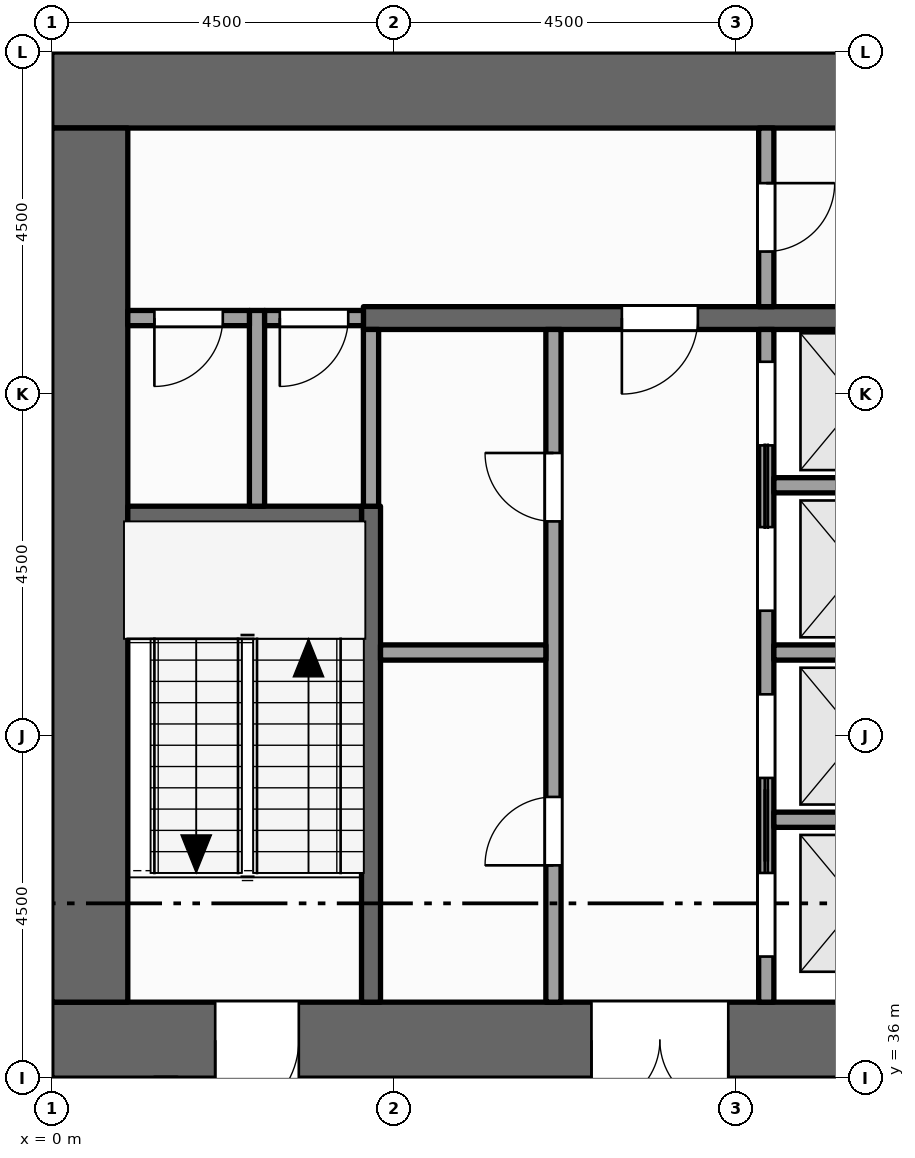
"""IFC4 building model, lengths in metres.
Left out: names, types, materials, properties, quantities, classifications, styles, units other than length and angle.
Written with IfcOpenShell. Run it as: python <this file> out.ifc"""

import sys

from ifc_helpers import new_model, si_unit, direction, frame, frame_2d, origin, place, context, subcontext, project, spatial, rectangle, extrude, element, fill, save


model = new_model("IFC4")
c1 = context("Model", 3, precision=1e-05, world=origin(), true_north=direction((0.0, 1.0)))
c2 = subcontext(c1, "Body", "Model", "MODEL_VIEW")
j1 = project(units=[si_unit("LENGTHUNIT", "METRE"), si_unit("PLANEANGLEUNIT", "RADIAN")], contexts=[c1])
p1 = place(None, origin())
s1 = spatial("IfcSite", under=j1, at=p1, CompositionType="ELEMENT")
p2 = place(p1, origin())
s2 = spatial("IfcBuilding", under=s1, at=p2, CompositionType="ELEMENT")
p3 = place(p2, frame((0.0, 0.0, 207.0)))
s3 = spatial("IfcBuildingStorey", under=s2, at=p3, CompositionType="ELEMENT", Elevation=207.0)
p4 = place(p3, frame((0.0, 36.5, -0.15), z_axis=(0.0, 0.0, 1.0), x_axis=(1.0, 0.0, 0.0)))
e1 = element("IfcWall", 1, at=p4, inside=s3, PredefinedType="SHEAR", context=c2, shape_type="SweptSolid", body=[
    extrude(rectangle(XDim=22.5, YDim=1.0, at=frame_2d((11.25, 0.0))), origin(), (0.0, 0.0, 1.0), 4.0),
])
p5 = place(p4, frame((7.1, 0.0, 0.15)))
e2 = element("IfcOpeningElement", 2, at=p5, cuts=e1, PredefinedType="OPENING", context=c2, shape_type="SweptSolid", body=[
    extrude(rectangle(XDim=1.8, YDim=2.1, at=frame_2d((0.9, 1.05))), frame((0.0, 0.51, 0.0), z_axis=(0.0, -1.0, 0.0), x_axis=(1.0, 0.0, 0.0)), (0.0, 0.0, 1.0), 1.02),
])
p6 = place(p4, frame((13.15, 0.0, 0.15)))
e3 = element("IfcOpeningElement", 3, at=p6, cuts=e1, PredefinedType="OPENING", context=c2, shape_type="SweptSolid", body=[
    extrude(rectangle(XDim=1.1, YDim=2.1, at=frame_2d((0.55, 1.05))), frame((0.0, 0.51, 0.0), z_axis=(0.0, -1.0, 0.0), x_axis=(1.0, 0.0, 0.0)), (0.0, 0.0, 1.0), 1.02),
])
p7 = place(p4, frame((2.15, 0.0, 0.15)))
e4 = element("IfcOpeningElement", 4, at=p7, cuts=e1, PredefinedType="OPENING", context=c2, shape_type="SweptSolid", body=[
    extrude(rectangle(XDim=1.1, YDim=2.1, at=frame_2d((0.55, 1.05))), frame((0.0, 0.51, 0.0), z_axis=(0.0, -1.0, 0.0), x_axis=(1.0, 0.0, 0.0)), (0.0, 0.0, 1.0), 1.02),
])
p8 = place(p4, frame((19.35, 0.0, 0.15)))
e5 = element("IfcOpeningElement", 5, at=p8, cuts=e1, PredefinedType="OPENING", context=c2, shape_type="SweptSolid", body=[
    extrude(rectangle(XDim=1.1, YDim=2.1, at=frame_2d((0.55, 1.05))), frame((0.0, 0.51, 0.0), z_axis=(0.0, -1.0, 0.0), x_axis=(1.0, 0.0, 0.0)), (0.0, 0.0, 1.0), 1.02),
])
p9 = place(p3, frame((0.0, 49.0, -0.15), z_axis=(0.0, 0.0, 1.0), x_axis=(1.0, 0.0, 0.0)))
e6 = element("IfcWall", 6, at=p9, inside=s3, PredefinedType="SHEAR", context=c2, shape_type="SweptSolid", body=[
    extrude(rectangle(XDim=22.5, YDim=1.0, at=frame_2d((11.25, 0.0))), origin(), (0.0, 0.0, 1.0), 4.0),
])
p10 = place(p3, frame((0.5, 37.0, -0.15), z_axis=(0.0, 0.0, 1.0), x_axis=(0.0, 1.0, 0.0)))
e7 = element("IfcWall", 7, at=p10, inside=s3, PredefinedType="SHEAR", context=c2, shape_type="SweptSolid", body=[
    extrude(rectangle(XDim=11.5, YDim=1.0, at=frame_2d((5.75, 0.0))), origin(), (0.0, 0.0, 1.0), 4.0),
])
p11 = place(p3, frame((2.7, 43.525, 0.0), z_axis=(0.0, 0.0, 1.0), x_axis=(0.0, 1.0, 0.0)))
e8 = element("IfcWall", 8, at=p11, inside=s3, PredefinedType="PARTITIONING", context=c2, shape_type="SweptSolid", body=[
    extrude(rectangle(XDim=2.575, YDim=0.2, at=frame_2d((1.288, 0.0))), origin(), (0.0, 0.0, 1.0), 3.85),
])
p12 = place(p3, frame((4.2, 37.0, 0.0), z_axis=(0.0, 0.0, 1.0), x_axis=(0.0, 1.0, 0.0)))
e9 = element("IfcWall", 9, at=p12, inside=s3, PredefinedType="SHEAR", context=c2, shape_type="SweptSolid", body=[
    extrude(rectangle(XDim=6.525, YDim=0.25, at=frame_2d((3.262, 0.0))), origin(), (0.0, 0.0, 1.0), 3.85),
])
p13 = place(p3, frame((4.2, 43.525, 0.0), z_axis=(0.0, 0.0, 1.0), x_axis=(0.0, 1.0, 0.0)))
e10 = element("IfcWall", 10, at=p13, inside=s3, PredefinedType="PARTITIONING", context=c2, shape_type="SweptSolid", body=[
    extrude(rectangle(XDim=2.325, YDim=0.2, at=frame_2d((1.163, 0.0))), origin(), (0.0, 0.0, 1.0), 3.85),
])
p14 = place(p3, frame((6.6, 37.0, 0.0), z_axis=(0.0, 0.0, 1.0), x_axis=(0.0, 1.0, 0.0)))
e11 = element("IfcWall", 11, at=p14, inside=s3, PredefinedType="PARTITIONING", context=c2, shape_type="SweptSolid", body=[
    extrude(rectangle(XDim=8.85, YDim=0.2, at=frame_2d((4.425, 0.0))), origin(), (0.0, 0.0, 1.0), 3.85),
])
p15 = place(p14, frame((1.8, 0.0, 0.0)))
e12 = element("IfcOpeningElement", 12, at=p15, cuts=e11, PredefinedType="OPENING", context=c2, shape_type="SweptSolid", body=[
    extrude(rectangle(XDim=0.9, YDim=2.1, at=frame_2d((0.45, 1.05))), frame((0.0, 0.11, 0.0), z_axis=(0.0, -1.0, 0.0), x_axis=(1.0, 0.0, 0.0)), (0.0, 0.0, 1.0), 0.22),
])
p16 = place(p14, frame((6.325, 0.0, 0.0)))
e13 = element("IfcOpeningElement", 13, at=p16, cuts=e11, PredefinedType="OPENING", context=c2, shape_type="SweptSolid", body=[
    extrude(rectangle(XDim=0.9, YDim=2.1, at=frame_2d((0.45, 1.05))), frame((0.0, 0.11, 0.0), z_axis=(0.0, -1.0, 0.0), x_axis=(1.0, 0.0, 0.0)), (0.0, 0.0, 1.0), 0.22),
])
p17 = place(p3, frame((9.4, 37.0, 0.0), z_axis=(0.0, 0.0, 1.0), x_axis=(0.0, 1.0, 0.0)))
e14 = element("IfcWall", 14, at=p17, inside=s3, PredefinedType="SOLIDWALL", context=c2, shape_type="SweptSolid", body=[
    extrude(rectangle(XDim=8.85, YDim=0.2, at=frame_2d((4.425, 0.0))), origin(), (0.0, 0.0, 1.0), 3.85),
])
p18 = place(p17, frame((0.6, 0.0, 0.012)))
e15 = element("IfcOpeningElement", 15, at=p18, cuts=e14, PredefinedType="OPENING", context=c2, shape_type="SweptSolid", body=[
    extrude(rectangle(XDim=1.1, YDim=2.1, at=frame_2d((0.55, 1.05))), frame((0.0, 0.11, 0.0), z_axis=(0.0, -1.0, 0.0), x_axis=(1.0, 0.0, 0.0)), (0.0, 0.0, 1.0), 0.22),
])
p19 = place(p17, frame((2.95, 0.0, 0.012)))
e16 = element("IfcOpeningElement", 16, at=p19, cuts=e14, PredefinedType="OPENING", context=c2, shape_type="SweptSolid", body=[
    extrude(rectangle(XDim=1.1, YDim=2.1, at=frame_2d((0.55, 1.05))), frame((0.0, 0.11, 0.0), z_axis=(0.0, -1.0, 0.0), x_axis=(1.0, 0.0, 0.0)), (0.0, 0.0, 1.0), 0.22),
])
p20 = place(p17, frame((5.15, 0.0, 0.012)))
e17 = element("IfcOpeningElement", 17, at=p20, cuts=e14, PredefinedType="OPENING", context=c2, shape_type="SweptSolid", body=[
    extrude(rectangle(XDim=1.1, YDim=2.1, at=frame_2d((0.55, 1.05))), frame((0.0, 0.11, 0.0), z_axis=(0.0, -1.0, 0.0), x_axis=(1.0, 0.0, 0.0)), (0.0, 0.0, 1.0), 0.22),
])
p21 = place(p17, frame((7.325, 0.0, 0.012)))
e18 = element("IfcOpeningElement", 18, at=p21, cuts=e14, PredefinedType="OPENING", context=c2, shape_type="SweptSolid", body=[
    extrude(rectangle(XDim=1.1, YDim=2.1, at=frame_2d((0.55, 1.05))), frame((0.0, 0.11, 0.0), z_axis=(0.0, -1.0, 0.0), x_axis=(1.0, 0.0, 0.0)), (0.0, 0.0, 1.0), 0.22),
])
p22 = place(p3, frame((9.4, 46.15, 0.0), z_axis=(0.0, 0.0, 1.0), x_axis=(0.0, 1.0, 0.0)))
e19 = element("IfcWall", 19, at=p22, inside=s3, PredefinedType="PARTITIONING", context=c2, shape_type="SweptSolid", body=[
    extrude(rectangle(XDim=2.35, YDim=0.2, at=frame_2d((1.175, 0.0))), origin(), (0.0, 0.0, 1.0), 3.85),
])
p23 = place(p22, frame((0.725, 0.0, 0.0)))
e20 = element("IfcOpeningElement", 20, at=p23, cuts=e19, PredefinedType="OPENING", context=c2, shape_type="SweptSolid", body=[
    extrude(rectangle(XDim=0.9, YDim=2.1, at=frame_2d((0.45, 1.05))), frame((0.0, 0.11, 0.0), z_axis=(0.0, -1.0, 0.0), x_axis=(1.0, 0.0, 0.0)), (0.0, 0.0, 1.0), 0.22),
])
p24 = place(p3, frame((9.5, 39.4, 0.0), z_axis=(0.0, 0.0, 1.0), x_axis=(1.0, 0.0, 0.0)))
e21 = element("IfcWall", 21, at=p24, inside=s3, PredefinedType="SOLIDWALL", context=c2, shape_type="SweptSolid", body=[
    extrude(rectangle(XDim=2.2, YDim=0.2, at=frame_2d((1.1, 0.0))), origin(), (0.0, 0.0, 1.0), 3.85),
])
p25 = place(p3, frame((4.325, 41.6, 0.0), z_axis=(0.0, 0.0, 1.0), x_axis=(1.0, 0.0, 0.0)))
e22 = element("IfcWall", 22, at=p25, inside=s3, PredefinedType="PARTITIONING", context=c2, shape_type="SweptSolid", body=[
    extrude(rectangle(XDim=2.175, YDim=0.2, at=frame_2d((1.087, 0.0))), origin(), (0.0, 0.0, 1.0), 3.85),
])
p26 = place(p3, frame((9.5, 41.6, 0.0), z_axis=(0.0, 0.0, 1.0), x_axis=(1.0, 0.0, 0.0)))
e23 = element("IfcWall", 23, at=p26, inside=s3, PredefinedType="SOLIDWALL", context=c2, shape_type="SweptSolid", body=[
    extrude(rectangle(XDim=2.2, YDim=0.2, at=frame_2d((1.1, 0.0))), origin(), (0.0, 0.0, 1.0), 3.85),
])
p27 = place(p3, frame((1.0, 43.4, 0.0), z_axis=(0.0, 0.0, 1.0), x_axis=(1.0, 0.0, 0.0)))
e24 = element("IfcWall", 24, at=p27, inside=s3, PredefinedType="SHEAR", context=c2, shape_type="SweptSolid", body=[
    extrude(rectangle(XDim=3.075, YDim=0.25, at=frame_2d((1.538, 0.0))), origin(), (0.0, 0.0, 1.0), 3.85),
])
p28 = place(p3, frame((9.5, 43.8, 0.0), z_axis=(0.0, 0.0, 1.0), x_axis=(1.0, 0.0, 0.0)))
e25 = element("IfcWall", 25, at=p28, inside=s3, PredefinedType="SOLIDWALL", context=c2, shape_type="SweptSolid", body=[
    extrude(rectangle(XDim=2.2, YDim=0.2, at=frame_2d((1.1, 0.0))), origin(), (0.0, 0.0, 1.0), 3.85),
])
p29 = place(p3, frame((1.0, 46.0, 0.0), z_axis=(0.0, 0.0, 1.0), x_axis=(1.0, 0.0, 0.0)))
e26 = element("IfcWall", 26, at=p29, inside=s3, PredefinedType="PARTITIONING", context=c2, shape_type="SweptSolid", body=[
    extrude(rectangle(XDim=1.6, YDim=0.2, at=frame_2d((0.8, 0.0))), origin(), (0.0, 0.0, 1.0), 3.85),
])
p30 = place(p29, frame((0.35, 0.0, 0.0)))
e27 = element("IfcOpeningElement", 27, at=p30, cuts=e26, PredefinedType="OPENING", context=c2, shape_type="SweptSolid", body=[
    extrude(rectangle(XDim=0.9, YDim=2.1, at=frame_2d((0.45, 1.05))), frame((0.0, 0.11, 0.0), z_axis=(0.0, -1.0, 0.0), x_axis=(1.0, 0.0, 0.0)), (0.0, 0.0, 1.0), 0.22),
])
p31 = place(p3, frame((2.8, 46.0, 0.0), z_axis=(0.0, 0.0, 1.0), x_axis=(1.0, 0.0, 0.0)))
e28 = element("IfcWall", 28, at=p31, inside=s3, PredefinedType="PARTITIONING", context=c2, shape_type="SweptSolid", body=[
    extrude(rectangle(XDim=1.3, YDim=0.2, at=frame_2d((0.65, 0.0))), origin(), (0.0, 0.0, 1.0), 3.85),
])
p32 = place(p31, frame((0.2, 0.0, 0.0)))
e29 = element("IfcOpeningElement", 29, at=p32, cuts=e28, PredefinedType="OPENING", context=c2, shape_type="SweptSolid", body=[
    extrude(rectangle(XDim=0.9, YDim=2.1, at=frame_2d((0.45, 1.05))), frame((0.0, 0.11, 0.0), z_axis=(0.0, -1.0, 0.0), x_axis=(1.0, 0.0, 0.0)), (0.0, 0.0, 1.0), 0.22),
])
p33 = place(p3, frame((4.1, 46.0, 0.0), z_axis=(0.0, 0.0, 1.0), x_axis=(1.0, 0.0, 0.0)))
e30 = element("IfcWall", 30, at=p33, inside=s3, PredefinedType="SHEAR", context=c2, shape_type="SweptSolid", body=[
    extrude(rectangle(XDim=14.5, YDim=0.3, at=frame_2d((7.25, 0.0))), origin(), (0.0, 0.0, 1.0), 3.85),
])
p34 = place(p33, frame((3.4, 0.0, 0.0)))
e31 = element("IfcOpeningElement", 31, at=p34, cuts=e30, PredefinedType="OPENING", context=c2, shape_type="SweptSolid", body=[
    extrude(rectangle(XDim=1.0, YDim=2.1, at=frame_2d((0.5, 1.05))), frame((0.0, 0.16, 0.0), z_axis=(0.0, -1.0, 0.0), x_axis=(1.0, 0.0, 0.0)), (0.0, 0.0, 1.0), 0.32),
])
p35 = place(p33, frame((9.1, 0.0, 0.0)))
e32 = element("IfcOpeningElement", 32, at=p35, cuts=e30, PredefinedType="OPENING", context=c2, shape_type="SweptSolid", body=[
    extrude(rectangle(XDim=1.0, YDim=2.1, at=frame_2d((0.5, 1.05))), frame((0.0, 0.16, 0.0), z_axis=(0.0, -1.0, 0.0), x_axis=(1.0, 0.0, 0.0)), (0.0, 0.0, 1.0), 0.32),
])
p36 = place(p18, origin())
e33 = element("IfcDoor", 33, at=p36, inside=s3, OperationType="SLIDING_TO_RIGHT", PredefinedType="DOOR", context=c2, shape_type="SweptSolid", body=[
    extrude(rectangle(XDim=1.1, YDim=2.1, at=frame_2d((0.55, 1.05))), frame((0.0, 0.025, 0.0), z_axis=(0.0, -1.0, 0.0), x_axis=(1.0, 0.0, 0.0)), (0.0, 0.0, 1.0), 0.05),
])
fill(e15, e33)
p37 = place(p19, origin())
e34 = element("IfcDoor", 34, at=p37, inside=s3, OperationType="SLIDING_TO_LEFT", PredefinedType="DOOR", context=c2, shape_type="SweptSolid", body=[
    extrude(rectangle(XDim=1.1, YDim=2.1, at=frame_2d((0.55, 1.05))), frame((0.0, 0.025, 0.0), z_axis=(0.0, -1.0, 0.0), x_axis=(1.0, 0.0, 0.0)), (0.0, 0.0, 1.0), 0.05),
])
fill(e16, e34)
p38 = place(p20, origin())
e35 = element("IfcDoor", 35, at=p38, inside=s3, OperationType="SLIDING_TO_RIGHT", PredefinedType="DOOR", context=c2, shape_type="SweptSolid", body=[
    extrude(rectangle(XDim=1.1, YDim=2.1, at=frame_2d((0.55, 1.05))), frame((0.0, 0.025, 0.0), z_axis=(0.0, -1.0, 0.0), x_axis=(1.0, 0.0, 0.0)), (0.0, 0.0, 1.0), 0.05),
])
fill(e17, e35)
p39 = place(p21, origin())
e36 = element("IfcDoor", 36, at=p39, inside=s3, OperationType="SLIDING_TO_LEFT", PredefinedType="DOOR", context=c2, shape_type="SweptSolid", body=[
    extrude(rectangle(XDim=1.1, YDim=2.1, at=frame_2d((0.55, 1.05))), frame((0.0, 0.025, 0.0), z_axis=(0.0, -1.0, 0.0), x_axis=(1.0, 0.0, 0.0)), (0.0, 0.0, 1.0), 0.05),
])
fill(e18, e36)
p40 = place(p5, origin())
e37 = element("IfcDoor", 37, at=p40, inside=s3, OperationType="DOUBLE_DOOR_SINGLE_SWING", PredefinedType="DOOR", context=c2, shape_type="SweptSolid", body=[
    extrude(rectangle(XDim=1.8, YDim=2.1, at=frame_2d((0.9, 1.05))), frame((0.0, 0.025, 0.0), z_axis=(0.0, -1.0, 0.0), x_axis=(1.0, 0.0, 0.0)), (0.0, 0.0, 1.0), 0.05),
])
fill(e2, e37)
p41 = place(p34, origin())
e38 = element("IfcDoor", 38, at=p41, inside=s3, OperationType="SINGLE_SWING_LEFT", PredefinedType="DOOR", context=c2, shape_type="SweptSolid", body=[
    extrude(rectangle(XDim=1.0, YDim=2.1, at=frame_2d((0.5, 1.05))), frame((0.0, 0.025, 0.0), z_axis=(0.0, -1.0, 0.0), x_axis=(1.0, 0.0, 0.0)), (0.0, 0.0, 1.0), 0.05),
])
fill(e31, e38)
p42 = place(p23, origin())
e39 = element("IfcDoor", 39, at=p42, inside=s3, OperationType="SINGLE_SWING_RIGHT", PredefinedType="DOOR", context=c2, shape_type="SweptSolid", body=[
    extrude(rectangle(XDim=0.9, YDim=2.1, at=frame_2d((0.45, 1.05))), frame((0.0, 0.025, 0.0), z_axis=(0.0, -1.0, 0.0), x_axis=(1.0, 0.0, 0.0)), (0.0, 0.0, 1.0), 0.05),
])
fill(e20, e39)
p43 = place(p7, origin())
e40 = element("IfcDoor", 40, at=p43, inside=s3, OperationType="SINGLE_SWING_LEFT", PredefinedType="DOOR", context=c2, shape_type="SweptSolid", body=[
    extrude(rectangle(XDim=1.1, YDim=2.1, at=frame_2d((0.55, 1.05))), frame((0.0, 0.025, 0.0), z_axis=(0.0, -1.0, 0.0), x_axis=(1.0, 0.0, 0.0)), (0.0, 0.0, 1.0), 0.05),
])
fill(e4, e40)
p44 = place(p30, origin())
e41 = element("IfcDoor", 41, at=p44, inside=s3, OperationType="SINGLE_SWING_LEFT", PredefinedType="DOOR", context=c2, shape_type="SweptSolid", body=[
    extrude(rectangle(XDim=0.9, YDim=2.1, at=frame_2d((0.45, 1.05))), frame((0.0, 0.025, 0.0), z_axis=(0.0, -1.0, 0.0), x_axis=(1.0, 0.0, 0.0)), (0.0, 0.0, 1.0), 0.05),
])
fill(e27, e41)
p45 = place(p32, origin())
e42 = element("IfcDoor", 42, at=p45, inside=s3, OperationType="SINGLE_SWING_LEFT", PredefinedType="DOOR", context=c2, shape_type="SweptSolid", body=[
    extrude(rectangle(XDim=0.9, YDim=2.1, at=frame_2d((0.45, 1.05))), frame((0.0, 0.025, 0.0), z_axis=(0.0, -1.0, 0.0), x_axis=(1.0, 0.0, 0.0)), (0.0, 0.0, 1.0), 0.05),
])
fill(e29, e42)
p46 = place(p15, origin())
e43 = element("IfcDoor", 43, at=p46, inside=s3, OperationType="SINGLE_SWING_LEFT", PredefinedType="DOOR", context=c2, shape_type="SweptSolid", body=[
    extrude(rectangle(XDim=0.9, YDim=2.1, at=frame_2d((0.45, 1.05))), frame((0.0, 0.025, 0.0), z_axis=(0.0, -1.0, 0.0), x_axis=(1.0, 0.0, 0.0)), (0.0, 0.0, 1.0), 0.05),
])
fill(e12, e43)
p47 = place(p16, origin())
e44 = element("IfcDoor", 44, at=p47, inside=s3, OperationType="SINGLE_SWING_RIGHT", PredefinedType="DOOR", context=c2, shape_type="SweptSolid", body=[
    extrude(rectangle(XDim=0.9, YDim=2.1, at=frame_2d((0.45, 1.05))), frame((0.0, 0.025, 0.0), z_axis=(0.0, -1.0, 0.0), x_axis=(1.0, 0.0, 0.0)), (0.0, 0.0, 1.0), 0.05),
])
fill(e13, e44)
save(model, sys.argv[1])
